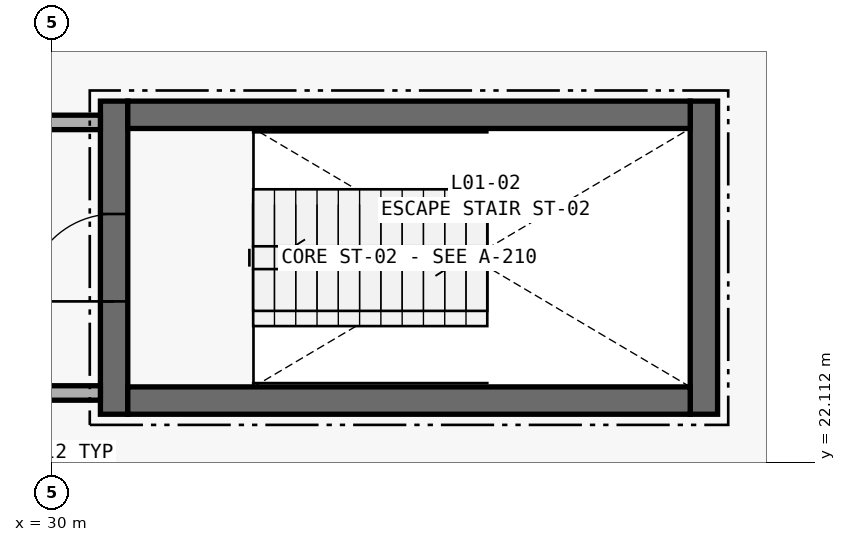
"""IFC4 building model, lengths in metres.
Left out: names, types, materials, properties, quantities, classifications, styles, units other than length and angle.
Written with IfcOpenShell. Run it as: python <this file> out.ifc"""

import sys

from ifc_helpers import new_model, si_unit, direction, frame, frame_2d, origin, place, context, subcontext, project, spatial, rectangle, extrude, element, fill, save


model = new_model("IFC4")
c1 = context("Model", 3, precision=1e-05, world=origin(), true_north=direction((0.0, 1.0)))
c2 = subcontext(c1, "Body", "Model", "MODEL_VIEW")
j1 = project(units=[si_unit("LENGTHUNIT", "METRE"), si_unit("PLANEANGLEUNIT", "RADIAN")], contexts=[c1])
p1 = place(None, origin())
s1 = spatial("IfcSite", under=j1, at=p1, CompositionType="ELEMENT")
p2 = place(p1, origin())
s2 = spatial("IfcBuilding", under=s1, at=p2, CompositionType="ELEMENT")
p3 = place(p2, frame((0.0, 0.0, 4.8)))
s3 = spatial("IfcBuildingStorey", under=s2, at=p3, CompositionType="ELEMENT", Elevation=4.8)
p4 = place(p3, frame((30.82, 22.74, 0.0), z_axis=(0.0, 0.0, 1.0), x_axis=(0.0, 1.0, 0.0)))
e1 = element("IfcWall", 1, at=p4, inside=s3, PredefinedType="SHEAR", context=c2, shape_type="SweptSolid", body=[
    extrude(rectangle(XDim=4.12, YDim=0.36, at=frame_2d((2.06, 0.0))), origin(), (0.0, 0.0, 1.0), 3.88),
])
p5 = place(p4, frame((1.485, 0.0, 0.0)))
e2 = element("IfcOpeningElement", 2, at=p5, cuts=e1, PredefinedType="OPENING", context=c2, shape_type="SweptSolid", body=[
    extrude(rectangle(XDim=1.15, YDim=2.15, at=frame_2d((0.575, 1.075))), frame((0.0, 0.195, 0.0), z_axis=(0.0, -1.0, 0.0), x_axis=(1.0, 0.0, 0.0)), (0.0, 0.0, 1.0), 0.39),
])
p6 = place(p3, frame((38.58, 22.74, 0.0), z_axis=(0.0, 0.0, 1.0), x_axis=(0.0, 1.0, 0.0)))
e3 = element("IfcWall", 3, at=p6, inside=s3, PredefinedType="SHEAR", context=c2, shape_type="SweptSolid", body=[
    extrude(rectangle(XDim=4.12, YDim=0.36, at=frame_2d((2.06, 0.0))), origin(), (0.0, 0.0, 1.0), 3.88),
])
for number, where, z_axis, x_axis in (
    (4, (31.0, 26.68, 0.0), (0.0, 0.0, 1.0), (1.0, 0.0, 0.0)),
    (5, (31.0, 22.92, 0.0), (0.0, 0.0, 1.0), (1.0, 0.0, 0.0)),
):
    element("IfcWall", number, at=place(p3, frame(where, z_axis=z_axis, x_axis=x_axis)), inside=s3, PredefinedType="SHEAR", context=c2, shape_type="SweptSolid", body=[
        extrude(rectangle(XDim=7.4, YDim=0.36, at=frame_2d((3.7, 0.0))), origin(), (0.0, 0.0, 1.0), 3.88),
    ])
p7 = place(p3, frame((29.485, 23.02, 0.0), z_axis=(0.0, 0.0, 1.0), x_axis=(1.0, 0.0, 0.0)))
e6 = element("IfcWall", 6, at=p7, inside=s3, PredefinedType="PARTITIONING", context=c2, shape_type="SweptSolid", body=[
    extrude(rectangle(XDim=1.155, YDim=0.19, at=frame_2d((0.577, 0.0))), origin(), (0.0, 0.0, 1.0), 2.76),
])
p8 = place(p3, frame((26.625, 26.58, 0.0), z_axis=(0.0, 0.0, 1.0), x_axis=(1.0, 0.0, 0.0)))
e7 = element("IfcWall", 7, at=p8, inside=s3, PredefinedType="PARTITIONING", context=c2, shape_type="SweptSolid", body=[
    extrude(rectangle(XDim=4.015, YDim=0.19, at=frame_2d((2.007, 0.0))), origin(), (0.0, 0.0, 1.0), 2.76),
])
p9 = place(p5, origin())
e8 = element("IfcDoor", 8, at=p9, inside=s3, OperationType="SINGLE_SWING_LEFT", PredefinedType="DOOR", context=c2, shape_type="SweptSolid", body=[
    extrude(rectangle(XDim=1.15, YDim=2.15, at=frame_2d((0.575, 1.075))), frame((0.0, 0.025, 0.0), z_axis=(0.0, -1.0, 0.0), x_axis=(1.0, 0.0, 0.0)), (0.0, 0.0, 1.0), 0.05),
])
fill(e2, e8)
save(model, sys.argv[1])
